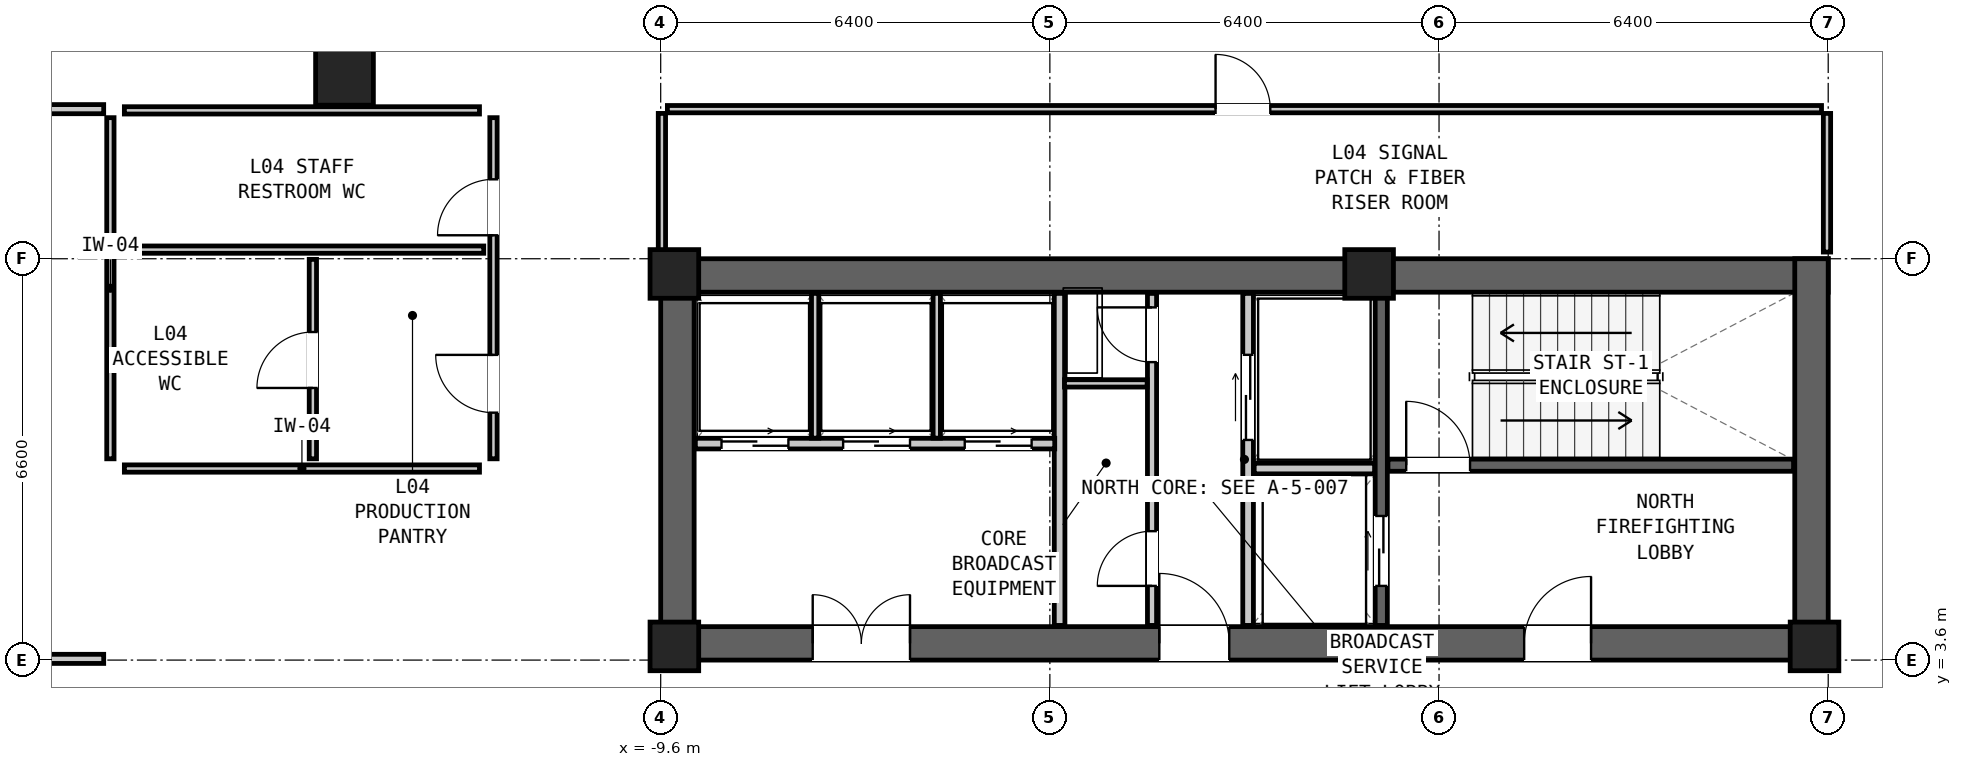
"""IFC4 building model, lengths in metres.
Left out: names, types, materials, properties, quantities, classifications, styles, units other than length and angle.
Written with IfcOpenShell. Run it as: python <this file> out.ifc"""

import sys

from ifc_helpers import new_model, si_unit, direction, frame, frame_2d, origin, origin_2d, place, context, subcontext, project, spatial, rectangle, hollow_rectangle, extrude, element, fill, save


model = new_model("IFC4")
c1 = context("Model", 3, precision=1e-05, world=origin(), true_north=direction((0.0, 1.0)))
c2 = subcontext(c1, "Body", "Model", "MODEL_VIEW")
j1 = project(units=[si_unit("LENGTHUNIT", "METRE"), si_unit("PLANEANGLEUNIT", "RADIAN")], contexts=[c1])
p1 = place(None, origin())
s1 = spatial("IfcSite", under=j1, at=p1, CompositionType="ELEMENT")
p2 = place(p1, origin())
s2 = spatial("IfcBuilding", under=s1, at=p2, CompositionType="ELEMENT")
p3 = place(p2, frame((0.0, 0.0, 17.7)))
s3 = spatial("IfcBuildingStorey", under=s2, at=p3, CompositionType="ELEMENT", Elevation=17.7)
p4 = place(p3, frame((-9.6, 9.925, 0.0), z_axis=(0.0, 0.0, 1.0), x_axis=(1.0, 0.0, 0.0)))
e1 = element("IfcWall", 1, at=p4, inside=s3, PredefinedType="SHEAR", context=c2, shape_type="SweptSolid", body=[
    extrude(rectangle(XDim=19.2, YDim=0.55, at=frame_2d((9.6, 0.0))), origin(), (0.0, 0.0, 1.0), 4.2),
])
p5 = place(p3, frame((-9.6, 3.875, 0.0), z_axis=(0.0, 0.0, 1.0), x_axis=(1.0, 0.0, 0.0)))
e2 = element("IfcWall", 2, at=p5, inside=s3, PredefinedType="SHEAR", context=c2, shape_type="SweptSolid", body=[
    extrude(rectangle(XDim=19.2, YDim=0.55, at=frame_2d((9.6, 0.0))), origin(), (0.0, 0.0, 1.0), 4.2),
])
p6 = place(p5, frame((14.2, 0.0, 0.0)))
e3 = element("IfcOpeningElement", 3, at=p6, cuts=e2, PredefinedType="OPENING", context=c2, shape_type="SweptSolid", body=[
    extrude(rectangle(XDim=1.1, YDim=2.08, at=frame_2d((0.55, 1.04))), frame((0.0, 0.287, 0.0), z_axis=(0.0, -1.0, 0.0), x_axis=(1.0, 0.0, 0.0)), (0.0, 0.0, 1.0), 0.574),
])
p7 = place(p5, frame((8.2, 0.0, 0.0)))
e4 = element("IfcOpeningElement", 4, at=p7, cuts=e2, PredefinedType="OPENING", context=c2, shape_type="SweptSolid", body=[
    extrude(rectangle(XDim=1.15, YDim=2.1, at=frame_2d((0.575, 1.05))), frame((0.0, 0.287, 0.0), z_axis=(0.0, -1.0, 0.0), x_axis=(1.0, 0.0, 0.0)), (0.0, 0.0, 1.0), 0.574),
])
p8 = place(p5, frame((2.5, 0.0, 0.0)))
e5 = element("IfcOpeningElement", 5, at=p8, cuts=e2, PredefinedType="OPENING", context=c2, shape_type="SweptSolid", body=[
    extrude(rectangle(XDim=1.6, YDim=2.12, at=frame_2d((0.8, 1.06))), frame((0.0, 0.287, 0.0), z_axis=(0.0, -1.0, 0.0), x_axis=(1.0, 0.0, 0.0)), (0.0, 0.0, 1.0), 0.574),
])
for number, where, z_axis, x_axis in (
    (6, (-9.325, 3.6, 0.0), (0.0, 0.0, 1.0), (0.0, 1.0, 0.0)),
    (7, (9.325, 3.6, 0.0), (0.0, 0.0, 1.0), (0.0, 1.0, 0.0)),
):
    element("IfcWall", number, at=place(p3, frame(where, z_axis=z_axis, x_axis=x_axis)), inside=s3, PredefinedType="SHEAR", context=c2, shape_type="SweptSolid", body=[
        extrude(rectangle(XDim=6.6, YDim=0.55, at=frame_2d((3.3, 0.0))), origin(), (0.0, 0.0, 1.0), 4.2),
    ])
p9 = place(p3, frame((-14.8, 13.2, 0.0), z_axis=(0.0, 0.0, 1.0), x_axis=(1.0, 0.0, 0.0)))
e8 = element("IfcColumn", 8, at=p9, inside=s3, PredefinedType="COLUMN", context=c2, shape_type="SweptSolid", body=[
    extrude(hollow_rectangle(XDim=0.95, YDim=0.95, WallThickness=0.06, at=origin_2d()), origin(), (0.0, 0.0, 1.0), 4.2),
])
for number, where, z_axis, x_axis in (
    (9, (-9.375, 9.95, 0.0), (0.0, 0.0, 1.0), (1.0, 0.0, 0.0)),
    (10, (2.05, 9.95, 0.0), (0.0, 0.0, 1.0), (1.0, 0.0, 0.0)),
    (11, (-9.375, 3.825, 0.0), (0.0, 0.0, 1.0), (1.0, 0.0, 0.0)),
    (12, (9.375, 3.825, 0.0), (0.0, 0.0, 1.0), (1.0, 0.0, 0.0)),
):
    element("IfcColumn", number, at=place(p3, frame(where, z_axis=z_axis, x_axis=x_axis)), inside=s3, PredefinedType="COLUMN", context=c2, shape_type="SweptSolid", body=[
        extrude(rectangle(XDim=0.8, YDim=0.8, at=origin_2d()), origin(), (0.0, 0.0, 1.0), 4.2),
    ])
p10 = place(p3, frame((2.36, 6.805, 0.0), z_axis=(0.0, 0.0, 1.0), x_axis=(1.0, 0.0, 0.0)))
e13 = element("IfcWall", 13, at=p10, inside=s3, PredefinedType="SHEAR", context=c2, shape_type="SweptSolid", body=[
    extrude(rectangle(XDim=6.67, YDim=0.2, at=frame_2d((3.335, 0.0))), origin(), (0.0, 0.0, 1.0), 3.82),
])
p11 = place(p10, frame((0.3, 0.0, 0.0)))
e14 = element("IfcOpeningElement", 14, at=p11, cuts=e13, PredefinedType="OPENING", context=c2, shape_type="SweptSolid", body=[
    extrude(rectangle(XDim=1.05, YDim=2.08, at=frame_2d((0.525, 1.04))), frame((0.0, 0.112, 0.0), z_axis=(0.0, -1.0, 0.0), x_axis=(1.0, 0.0, 0.0)), (0.0, 0.0, 1.0), 0.224),
])
p12 = place(p3, frame((2.25, 4.17, 0.0), z_axis=(0.0, 0.0, 1.0), x_axis=(0.0, 1.0, 0.0)))
e15 = element("IfcWall", 15, at=p12, inside=s3, PredefinedType="SHEAR", context=c2, shape_type="SweptSolid", body=[
    extrude(rectangle(XDim=5.46, YDim=0.2, at=frame_2d((2.73, 0.0))), origin(), (0.0, 0.0, 1.0), 3.82),
])
p13 = place(p12, frame((0.65, 0.0, 0.0)))
e16 = element("IfcOpeningElement", 16, at=p13, cuts=e15, PredefinedType="OPENING", context=c2, shape_type="SweptSolid", body=[
    extrude(rectangle(XDim=1.15, YDim=2.08, at=frame_2d((0.575, 1.04))), frame((0.0, 0.112, 0.0), z_axis=(0.0, -1.0, 0.0), x_axis=(1.0, 0.0, 0.0)), (0.0, 0.0, 1.0), 0.224),
])
p14 = place(p3, frame((0.06, 4.17, 0.0), z_axis=(0.0, 0.0, 1.0), x_axis=(0.0, 1.0, 0.0)))
e17 = element("IfcWall", 17, at=p14, inside=s3, PredefinedType="PARTITIONING", context=c2, shape_type="SweptSolid", body=[
    extrude(rectangle(XDim=5.46, YDim=0.175, at=frame_2d((2.73, 0.0))), origin(), (0.0, 0.0, 1.0), 3.82),
])
p15 = place(p14, frame((3.05, 0.0, 0.0)))
e18 = element("IfcOpeningElement", 18, at=p15, cuts=e17, PredefinedType="OPENING", context=c2, shape_type="SweptSolid", body=[
    extrude(rectangle(XDim=1.4, YDim=2.12, at=frame_2d((0.7, 1.06))), frame((0.0, 0.1, 0.0), z_axis=(0.0, -1.0, 0.0), x_axis=(1.0, 0.0, 0.0)), (0.0, 0.0, 1.0), 0.199),
])
p16 = place(p3, frame((0.16, 6.75, 0.0), z_axis=(0.0, 0.0, 1.0), x_axis=(1.0, 0.0, 0.0)))
e19 = element("IfcWall", 19, at=p16, inside=s3, PredefinedType="PARTITIONING", context=c2, shape_type="SweptSolid", body=[
    extrude(rectangle(XDim=1.98, YDim=0.175, at=frame_2d((0.99, 0.0))), origin(), (0.0, 0.0, 1.0), 3.82),
])
p17 = place(p3, frame((-3.04, 4.17, 0.0), z_axis=(0.0, 0.0, 1.0), x_axis=(0.0, 1.0, 0.0)))
e20 = element("IfcWall", 20, at=p17, inside=s3, PredefinedType="PARTITIONING", context=c2, shape_type="SweptSolid", body=[
    extrude(rectangle(XDim=5.46, YDim=0.175, at=frame_2d((2.73, 0.0))), origin(), (0.0, 0.0, 1.0), 3.82),
])
p18 = place(p3, frame((-1.52, 4.17, 0.0), z_axis=(0.0, 0.0, 1.0), x_axis=(0.0, 1.0, 0.0)))
e21 = element("IfcWall", 21, at=p18, inside=s3, PredefinedType="PARTITIONING", context=c2, shape_type="SweptSolid", body=[
    extrude(rectangle(XDim=5.46, YDim=0.15, at=frame_2d((2.73, 0.0))), origin(), (0.0, 0.0, 1.0), 3.82),
])
p19 = place(p18, frame((4.33, 0.0, 0.0)))
e22 = element("IfcOpeningElement", 22, at=p19, cuts=e21, PredefinedType="OPENING", context=c2, shape_type="SweptSolid", body=[
    extrude(rectangle(XDim=0.9, YDim=2.05, at=frame_2d((0.45, 1.025))), frame((0.0, 0.087, 0.0), z_axis=(0.0, -1.0, 0.0), x_axis=(1.0, 0.0, 0.0)), (0.0, 0.0, 1.0), 0.174),
])
p20 = place(p18, frame((0.65, 0.0, 0.0)))
e23 = element("IfcOpeningElement", 23, at=p20, cuts=e21, PredefinedType="OPENING", context=c2, shape_type="SweptSolid", body=[
    extrude(rectangle(XDim=0.9, YDim=2.05, at=frame_2d((0.45, 1.025))), frame((0.0, 0.087, 0.0), z_axis=(0.0, -1.0, 0.0), x_axis=(1.0, 0.0, 0.0)), (0.0, 0.0, 1.0), 0.174),
])
p21 = place(p3, frame((-2.96, 8.15, 0.0), z_axis=(0.0, 0.0, 1.0), x_axis=(1.0, 0.0, 0.0)))
e24 = element("IfcWall", 24, at=p21, inside=s3, PredefinedType="PARTITIONING", context=c2, shape_type="SweptSolid", body=[
    extrude(rectangle(XDim=1.36, YDim=0.12, at=frame_2d((0.68, 0.0))), origin(), (0.0, 0.0, 1.0), 3.82),
])
p22 = place(p3, frame((-9.03, 7.16, 0.0), z_axis=(0.0, 0.0, 1.0), x_axis=(1.0, 0.0, 0.0)))
e25 = element("IfcWall", 25, at=p22, inside=s3, PredefinedType="PARTITIONING", context=c2, shape_type="SweptSolid", body=[
    extrude(rectangle(XDim=5.91, YDim=0.175, at=frame_2d((2.955, 0.0))), origin(), (0.0, 0.0, 1.0), 3.82),
])
p23 = place(p22, frame((0.43, 0.0, 0.0)))
e26 = element("IfcOpeningElement", 26, at=p23, cuts=e25, PredefinedType="OPENING", context=c2, shape_type="SweptSolid", body=[
    extrude(rectangle(XDim=1.1, YDim=2.06, at=frame_2d((0.55, 1.03))), frame((0.0, 0.1, 0.0), z_axis=(0.0, -1.0, 0.0), x_axis=(1.0, 0.0, 0.0)), (0.0, 0.0, 1.0), 0.199),
])
p24 = place(p22, frame((2.43, 0.0, 0.0)))
e27 = element("IfcOpeningElement", 27, at=p24, cuts=e25, PredefinedType="OPENING", context=c2, shape_type="SweptSolid", body=[
    extrude(rectangle(XDim=1.1, YDim=2.06, at=frame_2d((0.55, 1.03))), frame((0.0, 0.1, 0.0), z_axis=(0.0, -1.0, 0.0), x_axis=(1.0, 0.0, 0.0)), (0.0, 0.0, 1.0), 0.199),
])
p25 = place(p22, frame((4.43, 0.0, 0.0)))
e28 = element("IfcOpeningElement", 28, at=p25, cuts=e25, PredefinedType="OPENING", context=c2, shape_type="SweptSolid", body=[
    extrude(rectangle(XDim=1.1, YDim=2.06, at=frame_2d((0.55, 1.03))), frame((0.0, 0.1, 0.0), z_axis=(0.0, -1.0, 0.0), x_axis=(1.0, 0.0, 0.0)), (0.0, 0.0, 1.0), 0.199),
])
for number, where, z_axis, x_axis in (
    (29, (-7.06, 7.25, 0.0), (0.0, 0.0, 1.0), (0.0, 1.0, 0.0)),
    (30, (-5.06, 7.25, 0.0), (0.0, 0.0, 1.0), (0.0, 1.0, 0.0)),
):
    element("IfcWall", number, at=place(p3, frame(where, z_axis=z_axis, x_axis=x_axis)), inside=s3, PredefinedType="PARTITIONING", context=c2, shape_type="SweptSolid", body=[
        extrude(rectangle(XDim=2.38, YDim=0.12, at=frame_2d((1.19, 0.0))), origin(), (0.0, 0.0, 1.0), 3.82),
    ])
for number, where, z_axis, x_axis in (
    (31, (-18.42, 6.75, 0.0), (0.0, 0.0, 1.0), (1.0, 0.0, 0.0)),
    (32, (-18.42, 12.64, 0.0), (0.0, 0.0, 1.0), (1.0, 0.0, 0.0)),
):
    element("IfcWall", number, at=place(p3, frame(where, z_axis=z_axis, x_axis=x_axis)), inside=s3, PredefinedType="PARTITIONING", context=c2, shape_type="SweptSolid", body=[
        extrude(rectangle(XDim=5.84, YDim=0.12, at=frame_2d((2.92, 0.0))), origin(), (0.0, 0.0, 1.0), 3.82),
    ])
p26 = place(p3, frame((-18.65, 6.91, 0.0), z_axis=(0.0, 0.0, 1.0), x_axis=(0.0, 1.0, 0.0)))
e33 = element("IfcWall", 33, at=p26, inside=s3, PredefinedType="PARTITIONING", context=c2, shape_type="SweptSolid", body=[
    extrude(rectangle(XDim=5.61, YDim=0.12, at=frame_2d((2.805, 0.0))), origin(), (0.0, 0.0, 1.0), 3.82),
])
p27 = place(p3, frame((-18.49, 10.35, 0.0), z_axis=(0.0, 0.0, 1.0), x_axis=(1.0, 0.0, 0.0)))
e34 = element("IfcWall", 34, at=p27, inside=s3, PredefinedType="PARTITIONING", context=c2, shape_type="SweptSolid", body=[
    extrude(rectangle(XDim=5.98, YDim=0.12, at=frame_2d((2.99, 0.0))), origin(), (0.0, 0.0, 1.0), 3.82),
])
p28 = place(p3, frame((-15.32, 6.91, 0.0), z_axis=(0.0, 0.0, 1.0), x_axis=(0.0, 1.0, 0.0)))
e35 = element("IfcWall", 35, at=p28, inside=s3, PredefinedType="PARTITIONING", context=c2, shape_type="SweptSolid", body=[
    extrude(rectangle(XDim=3.28, YDim=0.12, at=frame_2d((1.64, 0.0))), origin(), (0.0, 0.0, 1.0), 3.82),
])
p29 = place(p28, frame((1.165, 0.0, 0.0)))
e36 = element("IfcOpeningElement", 36, at=p29, cuts=e35, PredefinedType="OPENING", context=c2, shape_type="SweptSolid", body=[
    extrude(rectangle(XDim=0.92, YDim=2.1, at=frame_2d((0.46, 1.05))), frame((0.0, 0.072, 0.0), z_axis=(0.0, -1.0, 0.0), x_axis=(1.0, 0.0, 0.0)), (0.0, 0.0, 1.0), 0.144),
])
p30 = place(p3, frame((-12.35, 6.91, 0.0), z_axis=(0.0, 0.0, 1.0), x_axis=(0.0, 1.0, 0.0)))
e37 = element("IfcWall", 37, at=p30, inside=s3, PredefinedType="PARTITIONING", context=c2, shape_type="SweptSolid", body=[
    extrude(rectangle(XDim=5.61, YDim=0.12, at=frame_2d((2.805, 0.0))), origin(), (0.0, 0.0, 1.0), 3.82),
])
p31 = place(p30, frame((0.759, 0.0, 0.0)))
e38 = element("IfcOpeningElement", 38, at=p31, cuts=e37, PredefinedType="OPENING", context=c2, shape_type="SweptSolid", body=[
    extrude(rectangle(XDim=0.95, YDim=2.1, at=frame_2d((0.475, 1.05))), frame((0.0, 0.072, 0.0), z_axis=(0.0, -1.0, 0.0), x_axis=(1.0, 0.0, 0.0)), (0.0, 0.0, 1.0), 0.144),
])
p32 = place(p30, frame((3.676, 0.0, 0.0)))
e39 = element("IfcOpeningElement", 39, at=p32, cuts=e37, PredefinedType="OPENING", context=c2, shape_type="SweptSolid", body=[
    extrude(rectangle(XDim=0.92, YDim=2.1, at=frame_2d((0.46, 1.05))), frame((0.0, 0.072, 0.0), z_axis=(0.0, -1.0, 0.0), x_axis=(1.0, 0.0, 0.0)), (0.0, 0.0, 1.0), 0.144),
])
p33 = place(p3, frame((-9.49, 12.66, 0.0), z_axis=(0.0, 0.0, 1.0), x_axis=(1.0, 0.0, 0.0)))
e40 = element("IfcWall", 40, at=p33, inside=s3, PredefinedType="PARTITIONING", context=c2, shape_type="SweptSolid", body=[
    extrude(rectangle(XDim=18.98, YDim=0.12, at=frame_2d((9.49, 0.0))), origin(), (0.0, 0.0, 1.0), 3.82),
])
p34 = place(p33, frame((9.015, 0.0, 0.0)))
e41 = element("IfcOpeningElement", 41, at=p34, cuts=e40, PredefinedType="OPENING", context=c2, shape_type="SweptSolid", body=[
    extrude(rectangle(XDim=0.9, YDim=2.05, at=frame_2d((0.45, 1.025))), frame((0.0, 0.072, 0.0), z_axis=(0.0, -1.0, 0.0), x_axis=(1.0, 0.0, 0.0)), (0.0, 0.0, 1.0), 0.144),
])
for number, where, z_axis, x_axis in (
    (42, (-9.58, 10.31, 0.0), (0.0, 0.0, 1.0), (0.0, 1.0, 0.0)),
    (43, (9.58, 10.31, 0.0), (0.0, 0.0, 1.0), (0.0, 1.0, 0.0)),
):
    element("IfcWall", number, at=place(p3, frame(where, z_axis=z_axis, x_axis=x_axis)), inside=s3, PredefinedType="PARTITIONING", context=c2, shape_type="SweptSolid", body=[
        extrude(rectangle(XDim=2.28, YDim=0.12, at=frame_2d((1.14, 0.0))), origin(), (0.0, 0.0, 1.0), 3.82),
    ])
p35 = place(p3, frame((-28.24, 12.66, 0.0), z_axis=(0.0, 0.0, 1.0), x_axis=(1.0, 0.0, 0.0)))
e44 = element("IfcWall", 44, at=p35, inside=s3, PredefinedType="PARTITIONING", context=c2, shape_type="SweptSolid", body=[
    extrude(rectangle(XDim=9.48, YDim=0.15, at=frame_2d((4.74, 0.0))), origin(), (0.0, 0.0, 1.0), 3.82),
])
p36 = place(p3, frame((-28.24, 3.62, 0.0), z_axis=(0.0, 0.0, 1.0), x_axis=(1.0, 0.0, 0.0)))
e45 = element("IfcWall", 45, at=p36, inside=s3, PredefinedType="PARTITIONING", context=c2, shape_type="SweptSolid", body=[
    extrude(rectangle(XDim=9.48, YDim=0.15, at=frame_2d((4.74, 0.0))), origin(), (0.0, 0.0, 1.0), 2.682),
])
p37 = place(p36, frame((4.265, 0.0, 0.0)))
e46 = element("IfcOpeningElement", 46, at=p37, cuts=e45, PredefinedType="OPENING", context=c2, shape_type="SweptSolid", body=[
    extrude(rectangle(XDim=0.95, YDim=2.1, at=frame_2d((0.475, 1.05))), frame((0.0, 0.087, 0.0), z_axis=(0.0, -1.0, 0.0), x_axis=(1.0, 0.0, 0.0)), (0.0, 0.0, 1.0), 0.174),
])
p38 = place(p11, origin())
e47 = element("IfcDoor", 47, at=p38, inside=s3, OperationType="SINGLE_SWING_LEFT", PredefinedType="DOOR", context=c2, shape_type="SweptSolid", body=[
    extrude(rectangle(XDim=1.05, YDim=2.08, at=frame_2d((0.525, 1.04))), frame((0.0, 0.025, 0.0), z_axis=(0.0, -1.0, 0.0), x_axis=(1.0, 0.0, 0.0)), (0.0, 0.0, 1.0), 0.05),
])
fill(e14, e47)
p39 = place(p6, origin())
e48 = element("IfcDoor", 48, at=p39, inside=s3, OperationType="SINGLE_SWING_RIGHT", PredefinedType="DOOR", context=c2, shape_type="SweptSolid", body=[
    extrude(rectangle(XDim=1.1, YDim=2.08, at=frame_2d((0.55, 1.04))), frame((0.0, 0.025, 0.0), z_axis=(0.0, -1.0, 0.0), x_axis=(1.0, 0.0, 0.0)), (0.0, 0.0, 1.0), 0.05),
])
fill(e3, e48)
p40 = place(p13, origin())
e49 = element("IfcDoor", 49, at=p40, inside=s3, OperationType="DOUBLE_DOOR_SLIDING", PredefinedType="DOOR", context=c2, shape_type="SweptSolid", body=[
    extrude(rectangle(XDim=1.15, YDim=2.08, at=frame_2d((0.575, 1.04))), frame((0.0, 0.025, 0.0), z_axis=(0.0, -1.0, 0.0), x_axis=(1.0, 0.0, 0.0)), (0.0, 0.0, 1.0), 0.05),
])
fill(e16, e49)
p41 = place(p15, origin())
e50 = element("IfcDoor", 50, at=p41, inside=s3, OperationType="DOUBLE_DOOR_SLIDING", PredefinedType="DOOR", context=c2, shape_type="SweptSolid", body=[
    extrude(rectangle(XDim=1.4, YDim=2.12, at=frame_2d((0.7, 1.06))), frame((0.0, 0.025, 0.0), z_axis=(0.0, -1.0, 0.0), x_axis=(1.0, 0.0, 0.0)), (0.0, 0.0, 1.0), 0.05),
])
fill(e18, e50)
p42 = place(p7, origin())
e51 = element("IfcDoor", 51, at=p42, inside=s3, OperationType="SINGLE_SWING_LEFT", PredefinedType="DOOR", context=c2, shape_type="SweptSolid", body=[
    extrude(rectangle(XDim=1.15, YDim=2.1, at=frame_2d((0.575, 1.05))), frame((0.0, 0.025, 0.0), z_axis=(0.0, -1.0, 0.0), x_axis=(1.0, 0.0, 0.0)), (0.0, 0.0, 1.0), 0.05),
])
fill(e4, e51)
p43 = place(p19, origin())
e52 = element("IfcDoor", 52, at=p43, inside=s3, OperationType="SINGLE_SWING_RIGHT", PredefinedType="DOOR", context=c2, shape_type="SweptSolid", body=[
    extrude(rectangle(XDim=0.9, YDim=2.05, at=frame_2d((0.45, 1.025))), frame((0.0, 0.025, 0.0), z_axis=(0.0, -1.0, 0.0), x_axis=(1.0, 0.0, 0.0)), (0.0, 0.0, 1.0), 0.05),
])
fill(e22, e52)
p44 = place(p20, origin())
e53 = element("IfcDoor", 53, at=p44, inside=s3, OperationType="SINGLE_SWING_LEFT", PredefinedType="DOOR", context=c2, shape_type="SweptSolid", body=[
    extrude(rectangle(XDim=0.9, YDim=2.05, at=frame_2d((0.45, 1.025))), frame((0.0, 0.025, 0.0), z_axis=(0.0, -1.0, 0.0), x_axis=(1.0, 0.0, 0.0)), (0.0, 0.0, 1.0), 0.05),
])
fill(e23, e53)
p45 = place(p23, origin())
e54 = element("IfcDoor", 54, at=p45, inside=s3, OperationType="DOUBLE_DOOR_SLIDING", PredefinedType="DOOR", context=c2, shape_type="SweptSolid", body=[
    extrude(rectangle(XDim=1.1, YDim=2.06, at=frame_2d((0.55, 1.03))), frame((0.0, 0.025, 0.0), z_axis=(0.0, -1.0, 0.0), x_axis=(1.0, 0.0, 0.0)), (0.0, 0.0, 1.0), 0.05),
])
fill(e26, e54)
p46 = place(p24, origin())
e55 = element("IfcDoor", 55, at=p46, inside=s3, OperationType="DOUBLE_DOOR_SLIDING", PredefinedType="DOOR", context=c2, shape_type="SweptSolid", body=[
    extrude(rectangle(XDim=1.1, YDim=2.06, at=frame_2d((0.55, 1.03))), frame((0.0, 0.025, 0.0), z_axis=(0.0, -1.0, 0.0), x_axis=(1.0, 0.0, 0.0)), (0.0, 0.0, 1.0), 0.05),
])
fill(e27, e55)
p47 = place(p25, origin())
e56 = element("IfcDoor", 56, at=p47, inside=s3, OperationType="DOUBLE_DOOR_SLIDING", PredefinedType="DOOR", context=c2, shape_type="SweptSolid", body=[
    extrude(rectangle(XDim=1.1, YDim=2.06, at=frame_2d((0.55, 1.03))), frame((0.0, 0.025, 0.0), z_axis=(0.0, -1.0, 0.0), x_axis=(1.0, 0.0, 0.0)), (0.0, 0.0, 1.0), 0.05),
])
fill(e28, e56)
p48 = place(p8, origin())
e57 = element("IfcDoor", 57, at=p48, inside=s3, OperationType="DOUBLE_DOOR_SINGLE_SWING", PredefinedType="DOOR", context=c2, shape_type="SweptSolid", body=[
    extrude(rectangle(XDim=1.6, YDim=2.12, at=frame_2d((0.8, 1.06))), frame((0.0, 0.025, 0.0), z_axis=(0.0, -1.0, 0.0), x_axis=(1.0, 0.0, 0.0)), (0.0, 0.0, 1.0), 0.05),
])
fill(e5, e57)
p49 = place(p29, origin())
e58 = element("IfcDoor", 58, at=p49, inside=s3, OperationType="SINGLE_SWING_LEFT", PredefinedType="DOOR", context=c2, shape_type="SweptSolid", body=[
    extrude(rectangle(XDim=0.92, YDim=2.1, at=frame_2d((0.46, 1.05))), frame((0.0, 0.025, 0.0), z_axis=(0.0, -1.0, 0.0), x_axis=(1.0, 0.0, 0.0)), (0.0, 0.0, 1.0), 0.05),
])
fill(e36, e58)
p50 = place(p31, origin())
e59 = element("IfcDoor", 59, at=p50, inside=s3, OperationType="SINGLE_SWING_RIGHT", PredefinedType="DOOR", context=c2, shape_type="SweptSolid", body=[
    extrude(rectangle(XDim=0.95, YDim=2.1, at=frame_2d((0.475, 1.05))), frame((0.0, 0.025, 0.0), z_axis=(0.0, -1.0, 0.0), x_axis=(1.0, 0.0, 0.0)), (0.0, 0.0, 1.0), 0.05),
])
fill(e38, e59)
p51 = place(p32, origin())
e60 = element("IfcDoor", 60, at=p51, inside=s3, OperationType="SINGLE_SWING_LEFT", PredefinedType="DOOR", context=c2, shape_type="SweptSolid", body=[
    extrude(rectangle(XDim=0.92, YDim=2.1, at=frame_2d((0.46, 1.05))), frame((0.0, 0.025, 0.0), z_axis=(0.0, -1.0, 0.0), x_axis=(1.0, 0.0, 0.0)), (0.0, 0.0, 1.0), 0.05),
])
fill(e39, e60)
p52 = place(p34, origin())
e61 = element("IfcDoor", 61, at=p52, inside=s3, OperationType="SINGLE_SWING_LEFT", PredefinedType="DOOR", context=c2, shape_type="SweptSolid", body=[
    extrude(rectangle(XDim=0.9, YDim=2.05, at=frame_2d((0.45, 1.025))), frame((0.0, 0.025, 0.0), z_axis=(0.0, -1.0, 0.0), x_axis=(1.0, 0.0, 0.0)), (0.0, 0.0, 1.0), 0.05),
])
fill(e41, e61)
save(model, sys.argv[1])
